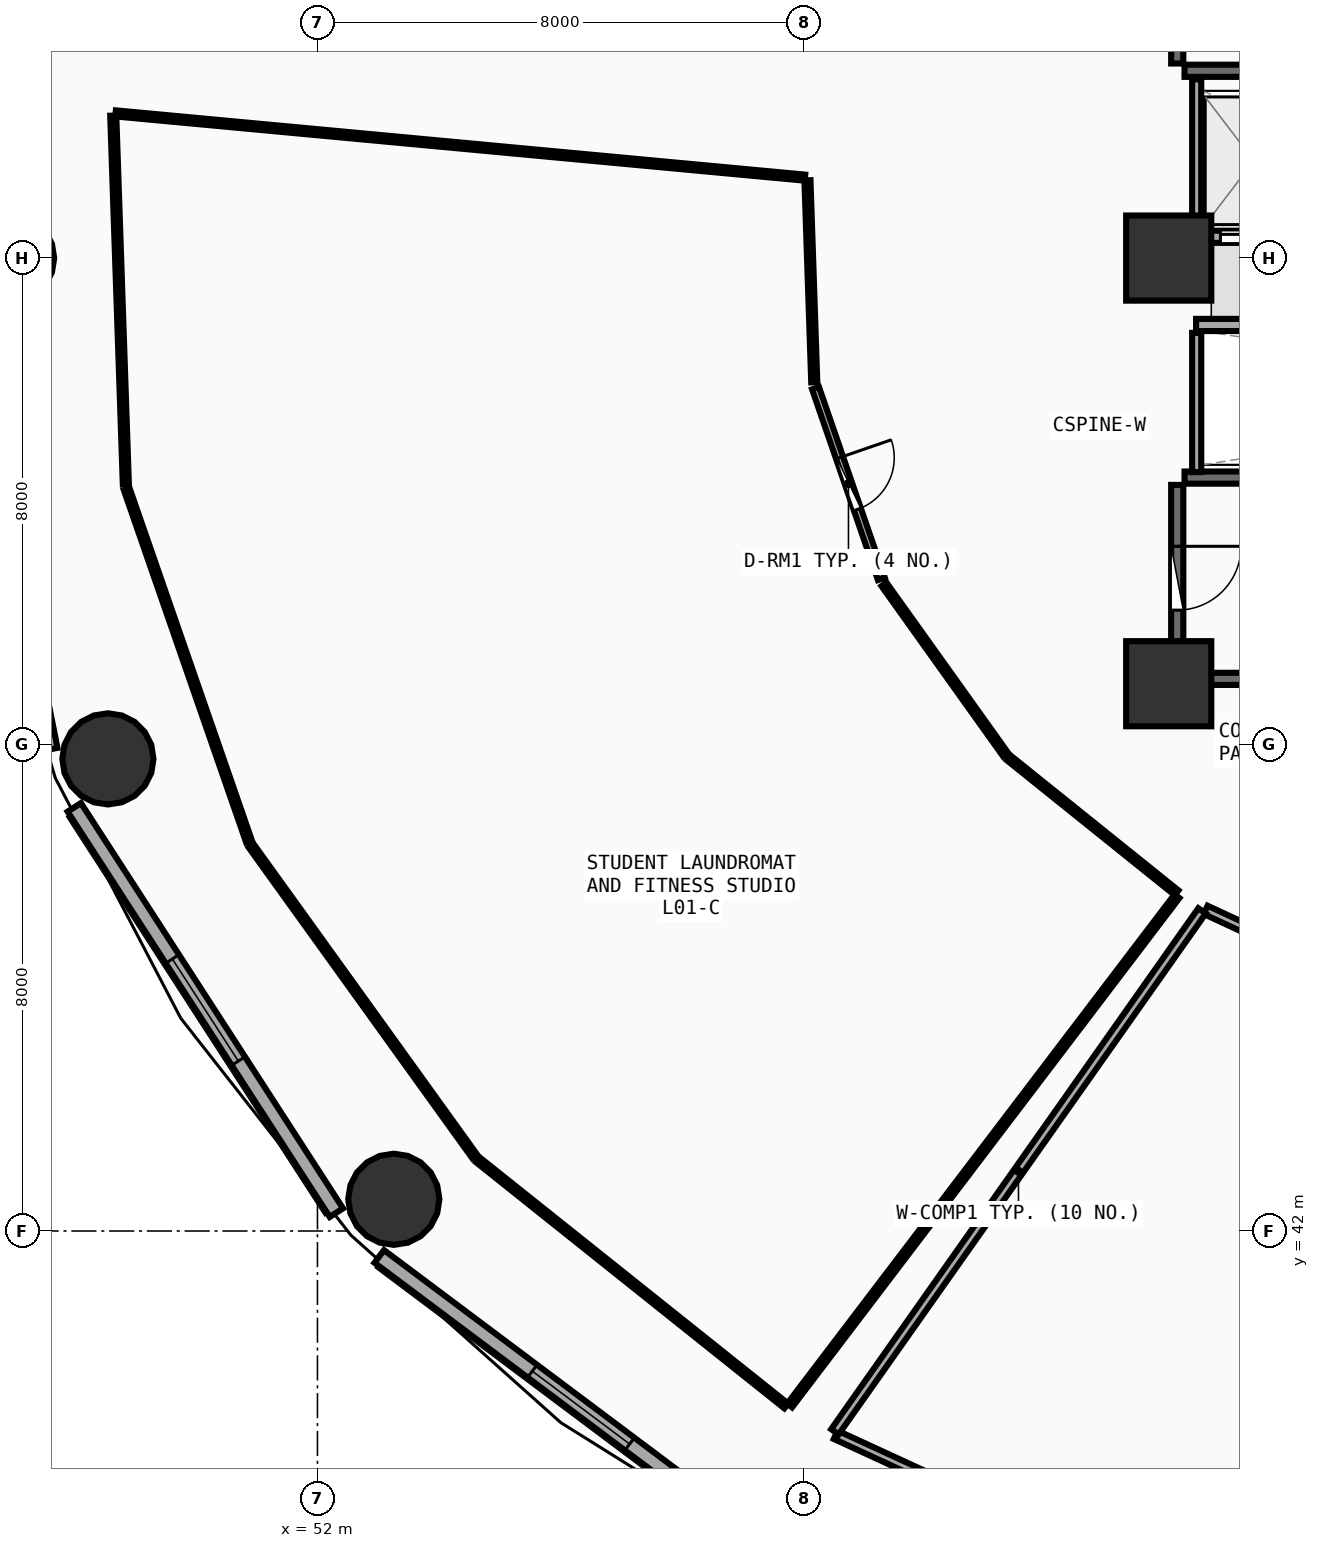
"""IFC4 building model, lengths in metres.
Left out: names, types, materials, properties, quantities, classifications, styles, units other than length and angle.
Written with IfcOpenShell. Run it as: python <this file> out.ifc"""

import sys

from ifc_helpers import new_model, si_unit, direction, frame, frame_2d, origin, origin_2d, place, context, subcontext, project, spatial, rectangle, circle, extrude, element, fill, save


model = new_model("IFC4")
c1 = context("Model", 3, precision=1e-05, world=origin(), true_north=direction((0.0, 1.0)))
c2 = subcontext(c1, "Body", "Model", "MODEL_VIEW")
j1 = project(units=[si_unit("LENGTHUNIT", "METRE"), si_unit("PLANEANGLEUNIT", "RADIAN")], contexts=[c1])
p1 = place(None, origin())
s1 = spatial("IfcSite", under=j1, at=p1, CompositionType="ELEMENT")
p2 = place(p1, origin())
s2 = spatial("IfcBuilding", under=s1, at=p2, CompositionType="ELEMENT")
p3 = place(p2, frame((0.0, 0.0, 4.5)))
s3 = spatial("IfcBuildingStorey", under=s2, at=p3, CompositionType="ELEMENT", Elevation=4.5)
for number, where, z_axis, x_axis in (
    (1, (66.0, 51.0, 0.0), (0.0, 0.0, 1.0), (1.0, 0.0, 0.0)),
    (2, (66.0, 58.0, 0.0), (0.0, 0.0, 1.0), (1.0, 0.0, 0.0)),
):
    element("IfcColumn", number, at=place(p3, frame(where, z_axis=z_axis, x_axis=x_axis)), inside=s3, PredefinedType="PILASTER", context=c2, shape_type="SweptSolid", body=[
        extrude(rectangle(XDim=1.4, YDim=1.4, at=origin_2d()), origin(), (0.0, 0.0, 1.0), 4.5),
    ])
for number, where, z_axis, x_axis in (
    (3, (46.92, 58.0, 0.0), (0.0, 0.0, 1.0), (1.0, 0.0, 0.0)),
    (4, (48.553, 49.764, 0.0), (0.0, 0.0, 1.0), (1.0, 0.0, 0.0)),
    (5, (53.256, 42.522, 0.0), (0.0, 0.0, 1.0), (1.0, 0.0, 0.0)),
):
    element("IfcColumn", number, at=place(p3, frame(where, z_axis=z_axis, x_axis=x_axis)), inside=s3, PredefinedType="COLUMN", context=c2, shape_type="SweptSolid", body=[
        extrude(circle(Radius=0.75, at=origin_2d()), origin(), (0.0, 0.0, 1.0), 4.5),
    ])
p4 = place(p3, frame((47.596, 66.08, 0.0), z_axis=(0.0, 0.0, 1.0), x_axis=(-0.193726159581, -0.98105564322, 0.0)))
e6 = element("IfcWall", 6, at=p4, inside=s3, PredefinedType="SOLIDWALL", context=c2, shape_type="SweptSolid", body=[
    extrude(rectangle(XDim=7.703, YDim=0.26, at=frame_2d((3.851, 0.0))), origin(), (0.0, 0.0, 1.0), 4.185),
])
p5 = place(p4, frame((2.851, 0.0, 0.85)))
e7 = element("IfcOpeningElement", 7, at=p5, cuts=e6, PredefinedType="OPENING", context=c2, shape_type="SweptSolid", body=[
    extrude(rectangle(XDim=2.0, YDim=1.75, at=frame_2d((1.0, 0.875))), frame((0.0, 0.14, 0.0), z_axis=(0.0, -1.0, 0.0), x_axis=(1.0, 0.0, 0.0)), (0.0, 0.0, 1.0), 0.28),
])
p6 = place(p3, frame((46.104, 57.477, 0.0), z_axis=(0.0, 0.0, 1.0), x_axis=(0.193726159581, -0.98105564322, 0.0)))
e8 = element("IfcWall", 8, at=p6, inside=s3, PredefinedType="SOLIDWALL", context=c2, shape_type="SweptSolid", body=[
    extrude(rectangle(XDim=7.703, YDim=0.26, at=frame_2d((3.851, 0.0))), origin(), (0.0, 0.0, 1.0), 4.185),
])
p7 = place(p6, frame((2.851, 0.0, 0.85)))
e9 = element("IfcOpeningElement", 9, at=p7, cuts=e8, PredefinedType="OPENING", context=c2, shape_type="SweptSolid", body=[
    extrude(rectangle(XDim=2.0, YDim=1.75, at=frame_2d((1.0, 0.875))), frame((0.0, 0.14, 0.0), z_axis=(0.0, -1.0, 0.0), x_axis=(1.0, 0.0, 0.0)), (0.0, 0.0, 1.0), 0.28),
])
p8 = place(p3, frame((48.001, 48.967, 0.0), z_axis=(0.0, 0.0, 1.0), x_axis=(0.543005114258, -0.839729388488, 0.0)))
e10 = element("IfcWall", 10, at=p8, inside=s3, PredefinedType="SOLIDWALL", context=c2, shape_type="SweptSolid", body=[
    extrude(rectangle(XDim=7.938, YDim=0.26, at=frame_2d((3.969, 0.0))), origin(), (0.0, 0.0, 1.0), 4.185),
])
p9 = place(p8, frame((2.969, 0.0, 0.85)))
e11 = element("IfcOpeningElement", 11, at=p9, cuts=e10, PredefinedType="OPENING", context=c2, shape_type="SweptSolid", body=[
    extrude(rectangle(XDim=2.0, YDim=1.75, at=frame_2d((1.0, 0.875))), frame((0.0, 0.14, 0.0), z_axis=(0.0, -1.0, 0.0), x_axis=(1.0, 0.0, 0.0)), (0.0, 0.0, 1.0), 0.28),
])
p10 = place(p3, frame((53.016, 41.582, 0.0), z_axis=(0.0, 0.0, 1.0), x_axis=(0.80030733173, -0.599590005569, 0.0)))
e12 = element("IfcWall", 12, at=p10, inside=s3, PredefinedType="SOLIDWALL", context=c2, shape_type="SweptSolid", body=[
    extrude(rectangle(XDim=8.291, YDim=0.26, at=frame_2d((4.145, 0.0))), origin(), (0.0, 0.0, 1.0), 4.185),
])
p11 = place(p10, frame((3.145, 0.0, 0.85)))
e13 = element("IfcOpeningElement", 13, at=p11, cuts=e12, PredefinedType="OPENING", context=c2, shape_type="SweptSolid", body=[
    extrude(rectangle(XDim=2.0, YDim=1.75, at=frame_2d((1.0, 0.875))), frame((0.0, 0.14, 0.0), z_axis=(0.0, -1.0, 0.0), x_axis=(1.0, 0.0, 0.0)), (0.0, 0.0, 1.0), 0.28),
])
p12 = place(p3, frame((66.26, 61.08, 0.0), z_axis=(0.0, 0.0, 1.0), x_axis=(1.0, 0.0, 0.0)))
e14 = element("IfcWall", 14, at=p12, inside=s3, PredefinedType="SHEAR", context=c2, shape_type="SweptSolid", body=[
    extrude(rectangle(XDim=7.16, YDim=0.2, at=frame_2d((3.58, 0.0))), origin(), (0.0, 0.0, 1.0), 4.2),
])
p13 = place(p3, frame((66.14, 64.27, 0.0), z_axis=(0.0, 0.0, 1.0), x_axis=(0.0, -1.0, 0.0)))
e15 = element("IfcWall", 15, at=p13, inside=s3, PredefinedType="SHEAR", context=c2, shape_type="SweptSolid", body=[
    extrude(rectangle(XDim=3.07, YDim=0.2, at=frame_2d((1.535, 0.0))), origin(), (0.0, 0.0, 1.0), 4.2),
])
p14 = place(p13, frame((1.01, 0.0, 0.0)))
e16 = element("IfcOpeningElement", 16, at=p14, cuts=e15, PredefinedType="OPENING", context=c2, shape_type="SweptSolid", body=[
    extrude(rectangle(XDim=1.05, YDim=2.1, at=frame_2d((0.525, 1.05))), frame((0.0, 0.11, 0.0), z_axis=(0.0, -1.0, 0.0), x_axis=(1.0, 0.0, 0.0)), (0.0, 0.0, 1.0), 0.22),
])
for number, where, z_axis, x_axis in (
    (17, (66.26, 51.08, 0.0), (0.0, 0.0, 1.0), (1.0, 0.0, 0.0)),
    (18, (73.42, 54.39, 0.0), (0.0, 0.0, 1.0), (-1.0, 0.0, 0.0)),
):
    element("IfcWall", number, at=place(p3, frame(where, z_axis=z_axis, x_axis=x_axis)), inside=s3, PredefinedType="SHEAR", context=c2, shape_type="SweptSolid", body=[
        extrude(rectangle(XDim=7.16, YDim=0.2, at=frame_2d((3.58, 0.0))), origin(), (0.0, 0.0, 1.0), 4.2),
    ])
p15 = place(p3, frame((66.14, 54.27, 0.0), z_axis=(0.0, 0.0, 1.0), x_axis=(0.0, -1.0, 0.0)))
e19 = element("IfcWall", 19, at=p15, inside=s3, PredefinedType="SHEAR", context=c2, shape_type="SweptSolid", body=[
    extrude(rectangle(XDim=3.07, YDim=0.2, at=frame_2d((1.535, 0.0))), origin(), (0.0, 0.0, 1.0), 4.2),
])
p16 = place(p15, frame((1.01, 0.0, 0.0)))
e20 = element("IfcOpeningElement", 20, at=p16, cuts=e19, PredefinedType="OPENING", context=c2, shape_type="SweptSolid", body=[
    extrude(rectangle(XDim=1.05, YDim=2.1, at=frame_2d((0.525, 1.05))), frame((0.0, 0.11, 0.0), z_axis=(0.0, -1.0, 0.0), x_axis=(1.0, 0.0, 0.0)), (0.0, 0.0, 1.0), 0.22),
])
p17 = place(p3, frame((66.45, 58.35, 0.0), z_axis=(0.0, 0.0, 1.0), x_axis=(1.0, 0.0, 0.0)))
e21 = element("IfcWall", 21, at=p17, inside=s3, PredefinedType="SOLIDWALL", context=c2, shape_type="SweptSolid", body=[
    extrude(rectangle(XDim=6.0, YDim=0.2, at=frame_2d((3.0, 0.0))), origin(), (0.0, 0.0, 1.0), 4.19),
])
p18 = place(p17, frame((0.4, 0.0, 0.0)))
e22 = element("IfcOpeningElement", 22, at=p18, cuts=e21, PredefinedType="OPENING", context=c2, shape_type="SweptSolid", body=[
    extrude(rectangle(XDim=1.1, YDim=2.1, at=frame_2d((0.55, 1.05))), frame((0.0, 0.11, 0.0), z_axis=(0.0, -1.0, 0.0), x_axis=(1.0, 0.0, 0.0)), (0.0, 0.0, 1.0), 0.22),
])
p19 = place(p17, frame((2.4, 0.0, 0.0)))
e23 = element("IfcOpeningElement", 23, at=p19, cuts=e21, PredefinedType="OPENING", context=c2, shape_type="SweptSolid", body=[
    extrude(rectangle(XDim=1.1, YDim=2.1, at=frame_2d((0.55, 1.05))), frame((0.0, 0.11, 0.0), z_axis=(0.0, -1.0, 0.0), x_axis=(1.0, 0.0, 0.0)), (0.0, 0.0, 1.0), 0.22),
])
p20 = place(p17, frame((4.4, 0.0, 0.0)))
e24 = element("IfcOpeningElement", 24, at=p20, cuts=e21, PredefinedType="OPENING", context=c2, shape_type="SweptSolid", body=[
    extrude(rectangle(XDim=1.1, YDim=2.1, at=frame_2d((0.55, 1.05))), frame((0.0, 0.11, 0.0), z_axis=(0.0, -1.0, 0.0), x_axis=(1.0, 0.0, 0.0)), (0.0, 0.0, 1.0), 0.22),
])
p21 = place(p3, frame((66.46, 58.48, 0.0), z_axis=(0.0, 0.0, 1.0), x_axis=(0.0, 1.0, 0.0)))
e25 = element("IfcWall", 25, at=p21, inside=s3, PredefinedType="PARTITIONING", context=c2, shape_type="SweptSolid", body=[
    extrude(rectangle(XDim=2.46, YDim=0.15, at=frame_2d((1.23, 0.0))), origin(), (0.0, 0.0, 1.0), 4.19),
])
p22 = place(p3, frame((66.45, 56.9, 0.0), z_axis=(0.0, 0.0, 1.0), x_axis=(1.0, 0.0, 0.0)))
e26 = element("IfcWall", 26, at=p22, inside=s3, PredefinedType="SOLIDWALL", context=c2, shape_type="SweptSolid", body=[
    extrude(rectangle(XDim=14.4, YDim=0.2, at=frame_2d((7.2, 0.0))), origin(), (0.0, 0.0, 1.0), 4.19),
])
p23 = place(p3, frame((66.46, 54.48, 0.0), z_axis=(0.0, 0.0, 1.0), x_axis=(0.0, 1.0, 0.0)))
e27 = element("IfcWall", 27, at=p23, inside=s3, PredefinedType="PARTITIONING", context=c2, shape_type="SweptSolid", body=[
    extrude(rectangle(XDim=2.29, YDim=0.15, at=frame_2d((1.145, 0.0))), origin(), (0.0, 0.0, 1.0), 4.19),
])
p24 = place(p3, frame((60.192, 55.86, 0.0), z_axis=(0.0, 0.0, 1.0), x_axis=(0.326296764791, -0.945267380843, 0.0)))
e28 = element("IfcWall", 28, at=p24, inside=s3, PredefinedType="PARTITIONING", context=c2, shape_type="SweptSolid", body=[
    extrude(rectangle(XDim=3.318, YDim=0.12, at=frame_2d((1.659, 0.0))), origin(), (0.0, 0.0, 1.0), 4.19),
])
p25 = place(p24, frame((1.209, 0.0, 0.0)))
e29 = element("IfcOpeningElement", 29, at=p25, cuts=e28, PredefinedType="OPENING", context=c2, shape_type="SweptSolid", body=[
    extrude(rectangle(XDim=0.9, YDim=2.08, at=frame_2d((0.45, 1.04))), frame((0.0, 0.07, 0.0), z_axis=(0.0, -1.0, 0.0), x_axis=(1.0, 0.0, 0.0)), (0.0, 0.0, 1.0), 0.14),
])
p26 = place(p3, frame((60.058, 59.279, 0.0), z_axis=(0.0, 0.0, 1.0), x_axis=(0.033786827999, -0.999429062142, 0.0)))
e30 = element("IfcWall", 30, at=p26, inside=s3, PredefinedType="PARTITIONING", context=c2, shape_type="SweptSolid", body=[
    extrude(rectangle(XDim=3.324, YDim=0.1, at=frame_2d((1.662, 0.0))), origin(), (0.0, 0.0, 1.0), 3.585),
])
p27 = place(p3, frame((61.317, 52.635, 0.0), z_axis=(0.0, 0.0, 1.0), x_axis=(0.581265057715, -0.813714281968, 0.0)))
e31 = element("IfcWall", 31, at=p27, inside=s3, PredefinedType="PARTITIONING", context=c2, shape_type="SweptSolid", body=[
    extrude(rectangle(XDim=3.439, YDim=0.1, at=frame_2d((1.719, 0.0))), origin(), (0.0, 0.0, 1.0), 3.585),
])
p28 = place(p3, frame((63.37, 49.779, 0.0), z_axis=(0.0, 0.0, 1.0), x_axis=(0.779622016763, -0.626250358067, 0.0)))
e32 = element("IfcWall", 32, at=p28, inside=s3, PredefinedType="PARTITIONING", context=c2, shape_type="SweptSolid", body=[
    extrude(rectangle(XDim=3.539, YDim=0.1, at=frame_2d((1.769, 0.0))), origin(), (0.0, 0.0, 1.0), 3.585),
])
p29 = place(p3, frame((66.136, 47.506, 0.0), z_axis=(0.0, 0.0, 1.0), x_axis=(-0.605364986989, -0.795948008684, 0.0)))
e33 = element("IfcWall", 33, at=p29, inside=s3, PredefinedType="PARTITIONING", context=c2, shape_type="SweptSolid", body=[
    extrude(rectangle(XDim=10.524, YDim=0.1, at=frame_2d((5.262, 0.0))), origin(), (0.0, 0.0, 1.0), 3.585),
])
p30 = place(p3, frame((59.71, 39.123, 0.0), z_axis=(0.0, 0.0, 1.0), x_axis=(-0.781602893215, 0.623776335972, 0.0)))
e34 = element("IfcWall", 34, at=p30, inside=s3, PredefinedType="PARTITIONING", context=c2, shape_type="SweptSolid", body=[
    extrude(rectangle(XDim=6.485, YDim=0.1, at=frame_2d((3.242, 0.0))), origin(), (0.0, 0.0, 1.0), 4.19),
])
p31 = place(p3, frame((54.587, 43.226, 0.0), z_axis=(0.0, 0.0, 1.0), x_axis=(-0.584098181026, 0.811683013819, 0.0)))
e35 = element("IfcWall", 35, at=p31, inside=s3, PredefinedType="PARTITIONING", context=c2, shape_type="SweptSolid", body=[
    extrude(rectangle(XDim=6.291, YDim=0.1, at=frame_2d((3.145, 0.0))), origin(), (0.0, 0.0, 1.0), 3.585),
])
p32 = place(p3, frame((50.876, 48.402, 0.0), z_axis=(0.0, 0.0, 1.0), x_axis=(-0.328006758099, 0.944675376328, 0.0)))
e36 = element("IfcWall", 36, at=p32, inside=s3, PredefinedType="PARTITIONING", context=c2, shape_type="SweptSolid", body=[
    extrude(rectangle(XDim=6.137, YDim=0.1, at=frame_2d((3.068, 0.0))), origin(), (0.0, 0.0, 1.0), 3.585),
])
p33 = place(p3, frame((48.849, 54.277, 0.0), z_axis=(0.0, 0.0, 1.0), x_axis=(-0.034150558558, 0.999416699555, 0.0)))
e37 = element("IfcWall", 37, at=p33, inside=s3, PredefinedType="PARTITIONING", context=c2, shape_type="SweptSolid", body=[
    extrude(rectangle(XDim=6.07, YDim=0.1, at=frame_2d((3.035, 0.0))), origin(), (0.0, 0.0, 1.0), 3.585),
])
p34 = place(p3, frame((48.68, 60.379, 0.0), z_axis=(0.0, 0.0, 1.0), x_axis=(0.995685013566, -0.092797380135, 0.0)))
e38 = element("IfcWall", 38, at=p34, inside=s3, PredefinedType="PARTITIONING", context=c2, shape_type="SweptSolid", body=[
    extrude(rectangle(XDim=11.386, YDim=0.1, at=frame_2d((5.693, 0.0))), origin(), (0.0, 0.0, 1.0), 3.885),
])
p35 = place(p3, frame((66.607, 47.281, 0.0), z_axis=(0.0, 0.0, 1.0), x_axis=(0.907209153003, -0.420679869625, 0.0)))
e39 = element("IfcWall", 39, at=p35, inside=s3, PredefinedType="PARTITIONING", context=c2, shape_type="SweptSolid", body=[
    extrude(rectangle(XDim=2.195, YDim=0.15, at=frame_2d((1.097, 0.0))), origin(), (0.0, 0.0, 1.0), 3.585),
])
p36 = place(p3, frame((64.206, 36.953, 0.0), z_axis=(0.0, 0.0, 1.0), x_axis=(-0.908344989121, 0.418221688508, 0.0)))
e40 = element("IfcWall", 40, at=p36, inside=s3, PredefinedType="PARTITIONING", context=c2, shape_type="SweptSolid", body=[
    extrude(rectangle(XDim=4.054, YDim=0.15, at=frame_2d((2.027, 0.0))), origin(), (0.0, 0.0, 1.0), 3.585),
])
p37 = place(p3, frame((60.51, 38.698, 0.0), z_axis=(0.0, 0.0, 1.0), x_axis=(0.576068501476, 0.817401420116, 0.0)))
e41 = element("IfcWall", 41, at=p37, inside=s3, PredefinedType="PARTITIONING", context=c2, shape_type="SweptSolid", body=[
    extrude(rectangle(XDim=10.481, YDim=0.15, at=frame_2d((5.241, 0.0))), origin(), (0.0, 0.0, 1.0), 3.585),
])
p38 = place(p9, origin())
e42 = element("IfcWindow", 42, at=p38, inside=s3, PartitioningType="SINGLE_PANEL", PredefinedType="WINDOW", context=c2, shape_type="SweptSolid", body=[
    extrude(rectangle(XDim=2.0, YDim=1.75, at=frame_2d((1.0, 0.875))), frame((0.0, 0.03, 0.0), z_axis=(0.0, -1.0, 0.0), x_axis=(1.0, 0.0, 0.0)), (0.0, 0.0, 1.0), 0.06),
])
fill(e11, e42)
p39 = place(p11, origin())
e43 = element("IfcWindow", 43, at=p39, inside=s3, PartitioningType="SINGLE_PANEL", PredefinedType="WINDOW", context=c2, shape_type="SweptSolid", body=[
    extrude(rectangle(XDim=2.0, YDim=1.75, at=frame_2d((1.0, 0.875))), frame((0.0, 0.03, 0.0), z_axis=(0.0, -1.0, 0.0), x_axis=(1.0, 0.0, 0.0)), (0.0, 0.0, 1.0), 0.06),
])
fill(e13, e43)
p40 = place(p16, origin())
e44 = element("IfcDoor", 44, at=p40, inside=s3, OperationType="SINGLE_SWING_LEFT", PredefinedType="DOOR", context=c2, shape_type="SweptSolid", body=[
    extrude(rectangle(XDim=1.05, YDim=2.1, at=frame_2d((0.525, 1.05))), frame((0.0, 0.025, 0.0), z_axis=(0.0, -1.0, 0.0), x_axis=(1.0, 0.0, 0.0)), (0.0, 0.0, 1.0), 0.05),
])
fill(e20, e44)
p41 = place(p18, origin())
e45 = element("IfcDoor", 45, at=p41, inside=s3, OperationType="DOUBLE_DOOR_SLIDING", PredefinedType="DOOR", context=c2, shape_type="SweptSolid", body=[
    extrude(rectangle(XDim=1.1, YDim=2.1, at=frame_2d((0.55, 1.05))), frame((0.0, 0.025, 0.0), z_axis=(0.0, -1.0, 0.0), x_axis=(1.0, 0.0, 0.0)), (0.0, 0.0, 1.0), 0.05),
])
fill(e22, e45)
p42 = place(p25, origin())
e46 = element("IfcDoor", 46, at=p42, inside=s3, OperationType="SINGLE_SWING_LEFT", PredefinedType="DOOR", context=c2, shape_type="SweptSolid", body=[
    extrude(rectangle(XDim=0.9, YDim=2.08, at=frame_2d((0.45, 1.04))), frame((0.0, 0.025, 0.0), z_axis=(0.0, -1.0, 0.0), x_axis=(1.0, 0.0, 0.0)), (0.0, 0.0, 1.0), 0.05),
])
fill(e29, e46)
save(model, sys.argv[1])
